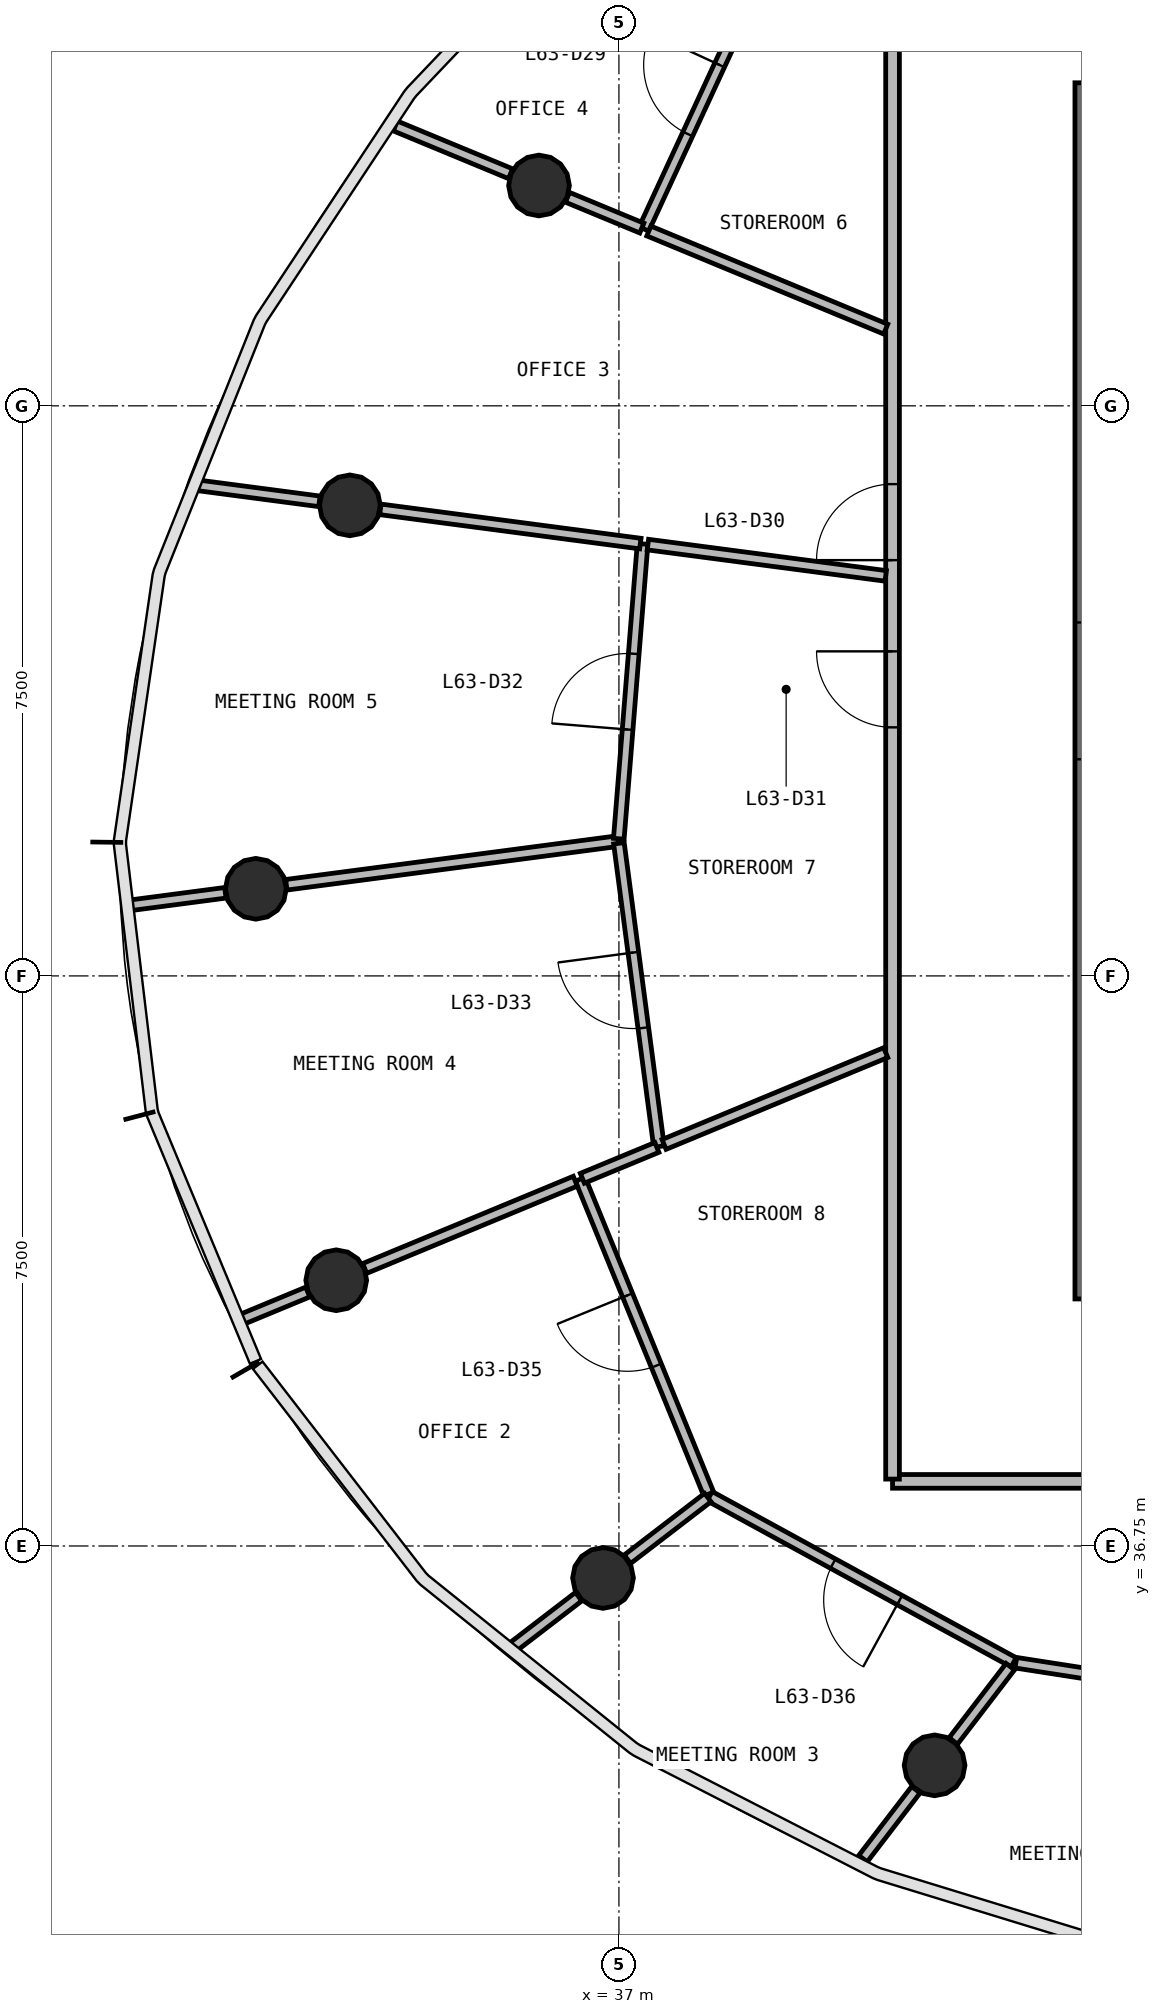
"""IFC4 building model, lengths in metres.
Left out: names, types, materials, properties, quantities, classifications, styles, units other than length and angle.
Written with IfcOpenShell. Run it as: python <this file> out.ifc"""

import sys

from ifc_helpers import new_model, si_unit, direction, frame, frame_2d, origin, origin_2d, place, context, subcontext, project, spatial, rectangle, circle, extrude, source, transform, mapped, element, fill, save


model = new_model("IFC4")
c1 = context("Model", 3, precision=1e-05, world=origin(), true_north=direction((0.0, 1.0)))
c2 = subcontext(c1, "Body", "Model", "MODEL_VIEW")
j1 = project(units=[si_unit("LENGTHUNIT", "METRE"), si_unit("PLANEANGLEUNIT", "RADIAN")], contexts=[c1])
p1 = place(None, origin())
s1 = spatial("IfcSite", under=j1, at=p1, CompositionType="ELEMENT")
p2 = place(p1, origin())
s2 = spatial("IfcBuilding", under=s1, at=p2, CompositionType="ELEMENT")
p3 = place(p2, frame((0.0, 0.0, 257.9)))
s3 = spatial("IfcBuildingStorey", under=s2, at=p3, CompositionType="ELEMENT", Elevation=257.9)
p4 = place(p3, frame((43.3, 56.0, 0.0), z_axis=(0.0, 0.0, 1.0), x_axis=(0.0, -1.0, 0.0)))
e1 = element("IfcWall", 1, at=p4, inside=s3, PredefinedType="SHEAR", context=c2, shape_type="SweptSolid", body=[
    extrude(rectangle(XDim=16.0, YDim=0.6, at=frame_2d((8.0, 0.0))), origin(), (0.0, 0.0, 1.0), 3.9),
])
p5 = place(p4, frame((7.1, 0.0, 0.0)))
e2 = element("IfcOpeningElement", 2, at=p5, cuts=e1, PredefinedType="OPENING", context=c2, shape_type="SweptSolid", body=[
    extrude(rectangle(XDim=1.8, YDim=2.1, at=frame_2d((0.9, 1.05))), frame((0.0, 0.31, 0.0), z_axis=(0.0, -1.0, 0.0), x_axis=(1.0, 0.0, 0.0)), (0.0, 0.0, 1.0), 0.62),
])
m1 = source(origin(), c2, "Body", "SweptSolid", [
    extrude(circle(Radius=0.4, at=origin_2d()), origin(), (0.0, 0.0, 1.0), 3.9),
])
for number, where, z_axis, x_axis in (
    (3, (35.948, 54.649, 0.0), (0.0, 0.0, 1.0), (1.0, 0.0, 0.0)),
    (4, (33.46, 50.441, 0.0), (0.0, 0.0, 1.0), (1.0, 0.0, 0.0)),
    (5, (32.223, 45.396, 0.0), (0.0, 0.0, 1.0), (1.0, 0.0, 0.0)),
    (6, (33.281, 40.246, 0.0), (0.0, 0.0, 1.0), (1.0, 0.0, 0.0)),
    (7, (36.791, 36.329, 0.0), (0.0, 0.0, 1.0), (1.0, 0.0, 0.0)),
    (8, (41.153, 33.864, 0.0), (0.0, 0.0, 1.0), (1.0, 0.0, 0.0)),
):
    element("IfcColumn", number, at=place(p3, frame(where, z_axis=z_axis, x_axis=x_axis)), inside=s3, PredefinedType="COLUMN", context=c2, shape_type="MappedRepresentation", body=[
        mapped(m1, transform((0.0, 0.0, 0.0), scale=1.0)),
    ])
p6 = place(p3, frame((63.4, 37.6, 0.0), z_axis=(0.0, 0.0, 1.0), x_axis=(-1.0, 0.0, 0.0)))
e9 = element("IfcWall", 9, at=p6, inside=s3, PredefinedType="PARTITIONING", context=c2, shape_type="SweptSolid", body=[
    extrude(rectangle(XDim=22.8, YDim=0.18, at=frame_2d((11.4, 0.0))), origin(), (0.0, 0.0, 1.0), 2.88),
])
p7 = place(p6, frame((12.95, 0.0, 0.0)))
e10 = element("IfcOpeningElement", 10, at=p7, cuts=e9, PredefinedType="OPENING", context=c2, shape_type="SweptSolid", body=[
    extrude(rectangle(XDim=1.0, YDim=2.1, at=frame_2d((0.5, 1.05))), frame((0.0, 0.1, 0.0), z_axis=(0.0, -1.0, 0.0), x_axis=(1.0, 0.0, 0.0)), (0.0, 0.0, 1.0), 0.2),
])
p8 = place(p6, frame((10.95, 0.0, 0.0)))
e11 = element("IfcOpeningElement", 11, at=p8, cuts=e9, PredefinedType="OPENING", context=c2, shape_type="SweptSolid", body=[
    extrude(rectangle(XDim=1.0, YDim=2.1, at=frame_2d((0.5, 1.05))), frame((0.0, 0.1, 0.0), z_axis=(0.0, -1.0, 0.0), x_axis=(1.0, 0.0, 0.0)), (0.0, 0.0, 1.0), 0.2),
])
p9 = place(p6, frame((8.75, 0.0, 0.0)))
e12 = element("IfcOpeningElement", 12, at=p9, cuts=e9, PredefinedType="OPENING", context=c2, shape_type="SweptSolid", body=[
    extrude(rectangle(XDim=1.0, YDim=2.1, at=frame_2d((0.5, 1.05))), frame((0.0, 0.1, 0.0), z_axis=(0.0, -1.0, 0.0), x_axis=(1.0, 0.0, 0.0)), (0.0, 0.0, 1.0), 0.2),
])
p10 = place(p3, frame((40.6, 37.63, 0.0), z_axis=(0.0, 0.0, 1.0), x_axis=(0.0, 1.0, 0.0)))
e13 = element("IfcWall", 13, at=p10, inside=s3, PredefinedType="PARTITIONING", context=c2, shape_type="SweptSolid", body=[
    extrude(rectangle(XDim=20.74, YDim=0.18, at=frame_2d((10.37, 0.0))), origin(), (0.0, 0.0, 1.0), 2.88),
])
p11 = place(p10, frame((12.09, 0.0, 0.0)))
e14 = element("IfcOpeningElement", 14, at=p11, cuts=e13, PredefinedType="OPENING", context=c2, shape_type="SweptSolid", body=[
    extrude(rectangle(XDim=1.0, YDim=2.1, at=frame_2d((0.5, 1.05))), frame((0.0, 0.1, 0.0), z_axis=(0.0, -1.0, 0.0), x_axis=(1.0, 0.0, 0.0)), (0.0, 0.0, 1.0), 0.2),
])
p12 = place(p10, frame((9.89, 0.0, 0.0)))
e15 = element("IfcOpeningElement", 15, at=p12, cuts=e13, PredefinedType="OPENING", context=c2, shape_type="SweptSolid", body=[
    extrude(rectangle(XDim=1.0, YDim=2.1, at=frame_2d((0.5, 1.05))), frame((0.0, 0.1, 0.0), z_axis=(0.0, -1.0, 0.0), x_axis=(1.0, 0.0, 0.0)), (0.0, 0.0, 1.0), 0.2),
])
p13 = place(p3, frame((42.193, 35.219, 0.0), z_axis=(0.0, 0.0, 1.0), x_axis=(-0.877448984614, 0.479669969249, 0.0)))
e16 = element("IfcWall", 16, at=p13, inside=s3, PredefinedType="PARTITIONING", context=c2, shape_type="SweptSolid", body=[
    extrude(rectangle(XDim=4.558, YDim=0.14, at=frame_2d((2.279, 0.0))), origin(), (0.0, 0.0, 1.0), 2.88),
])
p14 = place(p13, frame((1.708, 0.0, 0.0)))
e17 = element("IfcOpeningElement", 17, at=p14, cuts=e16, PredefinedType="OPENING", context=c2, shape_type="SweptSolid", body=[
    extrude(rectangle(XDim=1.0, YDim=2.1, at=frame_2d((0.5, 1.05))), frame((0.0, 0.08, 0.0), z_axis=(0.0, -1.0, 0.0), x_axis=(1.0, 0.0, 0.0)), (0.0, 0.0, 1.0), 0.16),
])
p15 = place(p3, frame((38.182, 37.433, 0.0), z_axis=(0.0, 0.0, 1.0), x_axis=(-0.377844499275, 0.925869069776, 0.0)))
e18 = element("IfcWall", 18, at=p15, inside=s3, PredefinedType="PARTITIONING", context=c2, shape_type="SweptSolid", body=[
    extrude(rectangle(XDim=4.475, YDim=0.14, at=frame_2d((2.237, 0.0))), origin(), (0.0, 0.0, 1.0), 2.88),
])
p16 = place(p15, frame((1.824, 0.0, 0.0)))
e19 = element("IfcOpeningElement", 19, at=p16, cuts=e18, PredefinedType="OPENING", context=c2, shape_type="SweptSolid", body=[
    extrude(rectangle(XDim=1.0, YDim=2.1, at=frame_2d((0.5, 1.05))), frame((0.0, 0.08, 0.0), z_axis=(0.0, -1.0, 0.0), x_axis=(1.0, 0.0, 0.0)), (0.0, 0.0, 1.0), 0.16),
])
p17 = place(p3, frame((36.996, 46.025, 0.0), z_axis=(0.0, 0.0, 1.0), x_axis=(-0.991449395419, -0.130491748102, 0.0)))
e20 = element("IfcWall", 20, at=p17, inside=s3, PredefinedType="PARTITIONING", context=c2, shape_type="SweptSolid", body=[
    extrude(rectangle(XDim=4.41, YDim=0.14, at=frame_2d((2.205, 0.0))), origin(), (0.0, 0.0, 1.0), 2.88),
])
p18 = place(p3, frame((46.433, 34.56, 0.0), z_axis=(0.0, 0.0, 1.0), x_axis=(-0.988131354716, 0.153611281572, 0.0)))
e21 = element("IfcWall", 21, at=p18, inside=s3, PredefinedType="PARTITIONING", context=c2, shape_type="SweptSolid", body=[
    extrude(rectangle(XDim=4.261, YDim=0.14, at=frame_2d((2.13, 0.0))), origin(), (0.0, 0.0, 1.0), 2.88),
])
p19 = place(p18, frame((1.611, 0.0, 0.0)))
e22 = element("IfcOpeningElement", 22, at=p19, cuts=e21, PredefinedType="OPENING", context=c2, shape_type="SweptSolid", body=[
    extrude(rectangle(XDim=1.0, YDim=2.1, at=frame_2d((0.5, 1.05))), frame((0.0, 0.08, 0.0), z_axis=(0.0, -1.0, 0.0), x_axis=(1.0, 0.0, 0.0)), (0.0, 0.0, 1.0), 0.16),
])
p20 = place(p3, frame((37.527, 42.005, 0.0), z_axis=(0.0, 0.0, 1.0), x_axis=(-0.130975494037, 0.99138560609, 0.0)))
e23 = element("IfcWall", 23, at=p20, inside=s3, PredefinedType="PARTITIONING", context=c2, shape_type="SweptSolid", body=[
    extrude(rectangle(XDim=4.024, YDim=0.14, at=frame_2d((2.012, 0.0))), origin(), (0.0, 0.0, 1.0), 2.88),
])
p21 = place(p20, frame((1.574, 0.0, 0.0)))
e24 = element("IfcOpeningElement", 24, at=p21, cuts=e23, PredefinedType="OPENING", context=c2, shape_type="SweptSolid", body=[
    extrude(rectangle(XDim=1.0, YDim=2.1, at=frame_2d((0.5, 1.05))), frame((0.0, 0.08, 0.0), z_axis=(0.0, -1.0, 0.0), x_axis=(1.0, 0.0, 0.0)), (0.0, 0.0, 1.0), 0.16),
])
p22 = place(p3, frame((36.998, 46.054, 0.0), z_axis=(0.0, 0.0, 1.0), x_axis=(0.080480689969, 0.996756168048, 0.0)))
e25 = element("IfcWall", 25, at=p22, inside=s3, PredefinedType="PARTITIONING", context=c2, shape_type="SweptSolid", body=[
    extrude(rectangle(XDim=3.892, YDim=0.14, at=frame_2d((1.946, 0.0))), origin(), (0.0, 0.0, 1.0), 2.88),
])
p23 = place(p22, frame((1.442, 0.0, 0.0)))
e26 = element("IfcOpeningElement", 26, at=p23, cuts=e25, PredefinedType="OPENING", context=c2, shape_type="SweptSolid", body=[
    extrude(rectangle(XDim=1.0, YDim=2.1, at=frame_2d((0.5, 1.05))), frame((0.0, 0.08, 0.0), z_axis=(0.0, -1.0, 0.0), x_axis=(1.0, 0.0, 0.0)), (0.0, 0.0, 1.0), 0.16),
])
p24 = place(p3, frame((37.329, 54.077, 0.0), z_axis=(0.0, 0.0, 1.0), x_axis=(0.41938588657, 0.907808062393, 0.0)))
e27 = element("IfcWall", 27, at=p24, inside=s3, PredefinedType="PARTITIONING", context=c2, shape_type="SweptSolid", body=[
    extrude(rectangle(XDim=3.826, YDim=0.14, at=frame_2d((1.913, 0.0))), origin(), (0.0, 0.0, 1.0), 2.88),
])
p25 = place(p24, frame((1.376, 0.0, 0.0)))
e28 = element("IfcOpeningElement", 28, at=p25, cuts=e27, PredefinedType="OPENING", context=c2, shape_type="SweptSolid", body=[
    extrude(rectangle(XDim=1.0, YDim=2.1, at=frame_2d((0.5, 1.05))), frame((0.0, 0.08, 0.0), z_axis=(0.0, -1.0, 0.0), x_axis=(1.0, 0.0, 0.0)), (0.0, 0.0, 1.0), 0.16),
])
p26 = place(p3, frame((40.51, 52.759, 0.0), z_axis=(0.0, 0.0, 1.0), x_axis=(-0.923865103175, 0.382718266008, 0.0)))
e29 = element("IfcWall", 29, at=p26, inside=s3, PredefinedType="PARTITIONING", context=c2, shape_type="SweptSolid", body=[
    extrude(rectangle(XDim=3.373, YDim=0.14, at=frame_2d((1.687, 0.0))), origin(), (0.0, 0.0, 1.0), 2.88),
])
p27 = place(p3, frame((37.282, 49.938, 0.0), z_axis=(0.0, 0.0, 1.0), x_axis=(-0.991450200573, 0.130485630566, 0.0)))
e30 = element("IfcWall", 30, at=p27, inside=s3, PredefinedType="PARTITIONING", context=c2, shape_type="SweptSolid", body=[
    extrude(rectangle(XDim=3.45, YDim=0.14, at=frame_2d((1.725, 0.0))), origin(), (0.0, 0.0, 1.0), 2.88),
])
p28 = place(p3, frame((40.51, 43.241, 0.0), z_axis=(0.0, 0.0, 1.0), x_axis=(-0.923862215035, -0.382725237776, 0.0)))
e31 = element("IfcWall", 31, at=p28, inside=s3, PredefinedType="PARTITIONING", context=c2, shape_type="SweptSolid", body=[
    extrude(rectangle(XDim=3.156, YDim=0.14, at=frame_2d((1.578, 0.0))), origin(), (0.0, 0.0, 1.0), 2.88),
])
p29 = place(p3, frame((40.51, 49.513, 0.0), z_axis=(0.0, 0.0, 1.0), x_axis=(-0.991447448148, 0.130506542215, 0.0)))
e32 = element("IfcWall", 32, at=p29, inside=s3, PredefinedType="PARTITIONING", context=c2, shape_type="SweptSolid", body=[
    extrude(rectangle(XDim=3.156, YDim=0.14, at=frame_2d((1.578, 0.0))), origin(), (0.0, 0.0, 1.0), 2.88),
])
p30 = place(p3, frame((36.426, 41.549, 0.0), z_axis=(0.0, 0.0, 1.0), x_axis=(-0.923867061942, -0.382713537595, 0.0)))
e33 = element("IfcWall", 33, at=p30, inside=s3, PredefinedType="PARTITIONING", context=c2, shape_type="SweptSolid", body=[
    extrude(rectangle(XDim=3.0, YDim=0.14, at=frame_2d((1.5, 0.0))), origin(), (0.0, 0.0, 1.0), 2.88),
])
p31 = place(p3, frame((35.574, 54.804, 0.0), z_axis=(0.0, 0.0, 1.0), x_axis=(-0.923884509339, 0.38267141702, 0.0)))
e34 = element("IfcWall", 34, at=p31, inside=s3, PredefinedType="PARTITIONING", context=c2, shape_type="SweptSolid", body=[
    extrude(rectangle(XDim=1.642, YDim=0.14, at=frame_2d((0.821, 0.0))), origin(), (0.0, 0.0, 1.0), 2.88),
])
p32 = place(p3, frame((33.059, 50.494, 0.0), z_axis=(0.0, 0.0, 1.0), x_axis=(-0.991450239083, 0.130485337956, 0.0)))
e35 = element("IfcWall", 35, at=p32, inside=s3, PredefinedType="PARTITIONING", context=c2, shape_type="SweptSolid", body=[
    extrude(rectangle(XDim=1.639, YDim=0.14, at=frame_2d((0.819, 0.0))), origin(), (0.0, 0.0, 1.0), 2.88),
])
p33 = place(p3, frame((38.169, 37.387, 0.0), z_axis=(0.0, 0.0, 1.0), x_axis=(-0.793358692504, -0.608754453805, 0.0)))
e36 = element("IfcWall", 36, at=p33, inside=s3, PredefinedType="PARTITIONING", context=c2, shape_type="SweptSolid", body=[
    extrude(rectangle(XDim=1.333, YDim=0.14, at=frame_2d((0.667, 0.0))), origin(), (0.0, 0.0, 1.0), 2.88),
])
p34 = place(p3, frame((42.15, 35.163, 0.0), z_axis=(0.0, 0.0, 1.0), x_axis=(-0.608839083006, -0.793293748245, 0.0)))
e37 = element("IfcWall", 37, at=p34, inside=s3, PredefinedType="PARTITIONING", context=c2, shape_type="SweptSolid", body=[
    extrude(rectangle(XDim=1.232, YDim=0.14, at=frame_2d((0.616, 0.0))), origin(), (0.0, 0.0, 1.0), 2.88),
])
p35 = place(p3, frame((31.822, 45.344, 0.0), z_axis=(0.0, 0.0, 1.0), x_axis=(-0.991436741362, -0.130587855015, 0.0)))
e38 = element("IfcWall", 38, at=p35, inside=s3, PredefinedType="PARTITIONING", context=c2, shape_type="SweptSolid", body=[
    extrude(rectangle(XDim=1.279, YDim=0.14, at=frame_2d((0.639, 0.0))), origin(), (0.0, 0.0, 1.0), 2.88),
])
p36 = place(p3, frame((40.907, 33.543, 0.0), z_axis=(0.0, 0.0, 1.0), x_axis=(-0.60864680101, -0.793441284293, 0.0)))
e39 = element("IfcWall", 39, at=p36, inside=s3, PredefinedType="PARTITIONING", context=c2, shape_type="SweptSolid", body=[
    extrude(rectangle(XDim=1.143, YDim=0.14, at=frame_2d((0.571, 0.0))), origin(), (0.0, 0.0, 1.0), 2.88),
])
p37 = place(p3, frame((37.499, 41.994, 0.0), z_axis=(0.0, 0.0, 1.0), x_axis=(-0.923837370253, -0.382785205205, 0.0)))
e40 = element("IfcWall", 40, at=p37, inside=s3, PredefinedType="PARTITIONING", context=c2, shape_type="SweptSolid", body=[
    extrude(rectangle(XDim=1.061, YDim=0.14, at=frame_2d((0.531, 0.0))), origin(), (0.0, 0.0, 1.0), 2.88),
])
p38 = place(p3, frame((36.469, 36.083, 0.0), z_axis=(0.0, 0.0, 1.0), x_axis=(-0.793297066138, -0.608834759895, 0.0)))
e41 = element("IfcWall", 41, at=p38, inside=s3, PredefinedType="PARTITIONING", context=c2, shape_type="SweptSolid", body=[
    extrude(rectangle(XDim=1.118, YDim=0.14, at=frame_2d((0.559, 0.0))), origin(), (0.0, 0.0, 1.0), 2.88),
])
p39 = place(p3, frame((37.301, 54.088, 0.0), z_axis=(0.0, 0.0, 1.0), x_axis=(-0.923777919461, 0.382928655908, 0.0)))
e42 = element("IfcWall", 42, at=p39, inside=s3, PredefinedType="PARTITIONING", context=c2, shape_type="SweptSolid", body=[
    extrude(rectangle(XDim=1.059, YDim=0.14, at=frame_2d((0.53, 0.0))), origin(), (0.0, 0.0, 1.0), 2.88),
])
p40 = place(p3, frame((32.906, 40.091, 0.0), z_axis=(0.0, 0.0, 1.0), x_axis=(-0.923893859205, -0.382648842835, 0.0)))
e43 = element("IfcWall", 43, at=p40, inside=s3, PredefinedType="PARTITIONING", context=c2, shape_type="SweptSolid", body=[
    extrude(rectangle(XDim=0.944, YDim=0.14, at=frame_2d((0.472, 0.0))), origin(), (0.0, 0.0, 1.0), 2.88),
])
m2 = source(origin(), c2, "Body", "SweptSolid", [
    extrude(rectangle(XDim=1.0, YDim=2.1, at=frame_2d((0.5, 1.05))), frame((0.0, 0.025, 0.0), z_axis=(0.0, -1.0, 0.0), x_axis=(1.0, 0.0, 0.0)), (0.0, 0.0, 1.0), 0.05),
])
p41 = place(p25, origin())
e44 = element("IfcDoor", 44, at=p41, inside=s3, OperationType="SINGLE_SWING_RIGHT", PredefinedType="DOOR", context=c2, shape_type="MappedRepresentation", body=[
    mapped(m2, transform((0.0, 0.0, 0.0), scale=1.0)),
])
fill(e28, e44)
p42 = place(p11, origin())
e45 = element("IfcDoor", 45, at=p42, inside=s3, OperationType="SINGLE_SWING_LEFT", PredefinedType="DOOR", context=c2, shape_type="MappedRepresentation", body=[
    mapped(m2, transform((0.0, 0.0, 0.0), scale=1.0)),
])
fill(e14, e45)
p43 = place(p12, origin())
e46 = element("IfcDoor", 46, at=p43, inside=s3, OperationType="SINGLE_SWING_RIGHT", PredefinedType="DOOR", context=c2, shape_type="MappedRepresentation", body=[
    mapped(m2, transform((0.0, 0.0, 0.0), scale=1.0)),
])
fill(e15, e46)
p44 = place(p23, origin())
e47 = element("IfcDoor", 47, at=p44, inside=s3, OperationType="SINGLE_SWING_LEFT", PredefinedType="DOOR", context=c2, shape_type="MappedRepresentation", body=[
    mapped(m2, transform((0.0, 0.0, 0.0), scale=1.0)),
])
fill(e26, e47)
p45 = place(p21, origin())
e48 = element("IfcDoor", 48, at=p45, inside=s3, OperationType="SINGLE_SWING_RIGHT", PredefinedType="DOOR", context=c2, shape_type="MappedRepresentation", body=[
    mapped(m2, transform((0.0, 0.0, 0.0), scale=1.0)),
])
fill(e24, e48)
p46 = place(p16, origin())
e49 = element("IfcDoor", 49, at=p46, inside=s3, OperationType="SINGLE_SWING_RIGHT", PredefinedType="DOOR", context=c2, shape_type="MappedRepresentation", body=[
    mapped(m2, transform((0.0, 0.0, 0.0), scale=1.0)),
])
fill(e19, e49)
p47 = place(p14, origin())
e50 = element("IfcDoor", 50, at=p47, inside=s3, OperationType="SINGLE_SWING_LEFT", PredefinedType="DOOR", context=c2, shape_type="MappedRepresentation", body=[
    mapped(m2, transform((0.0, 0.0, 0.0), scale=1.0)),
])
fill(e17, e50)
save(model, sys.argv[1])
